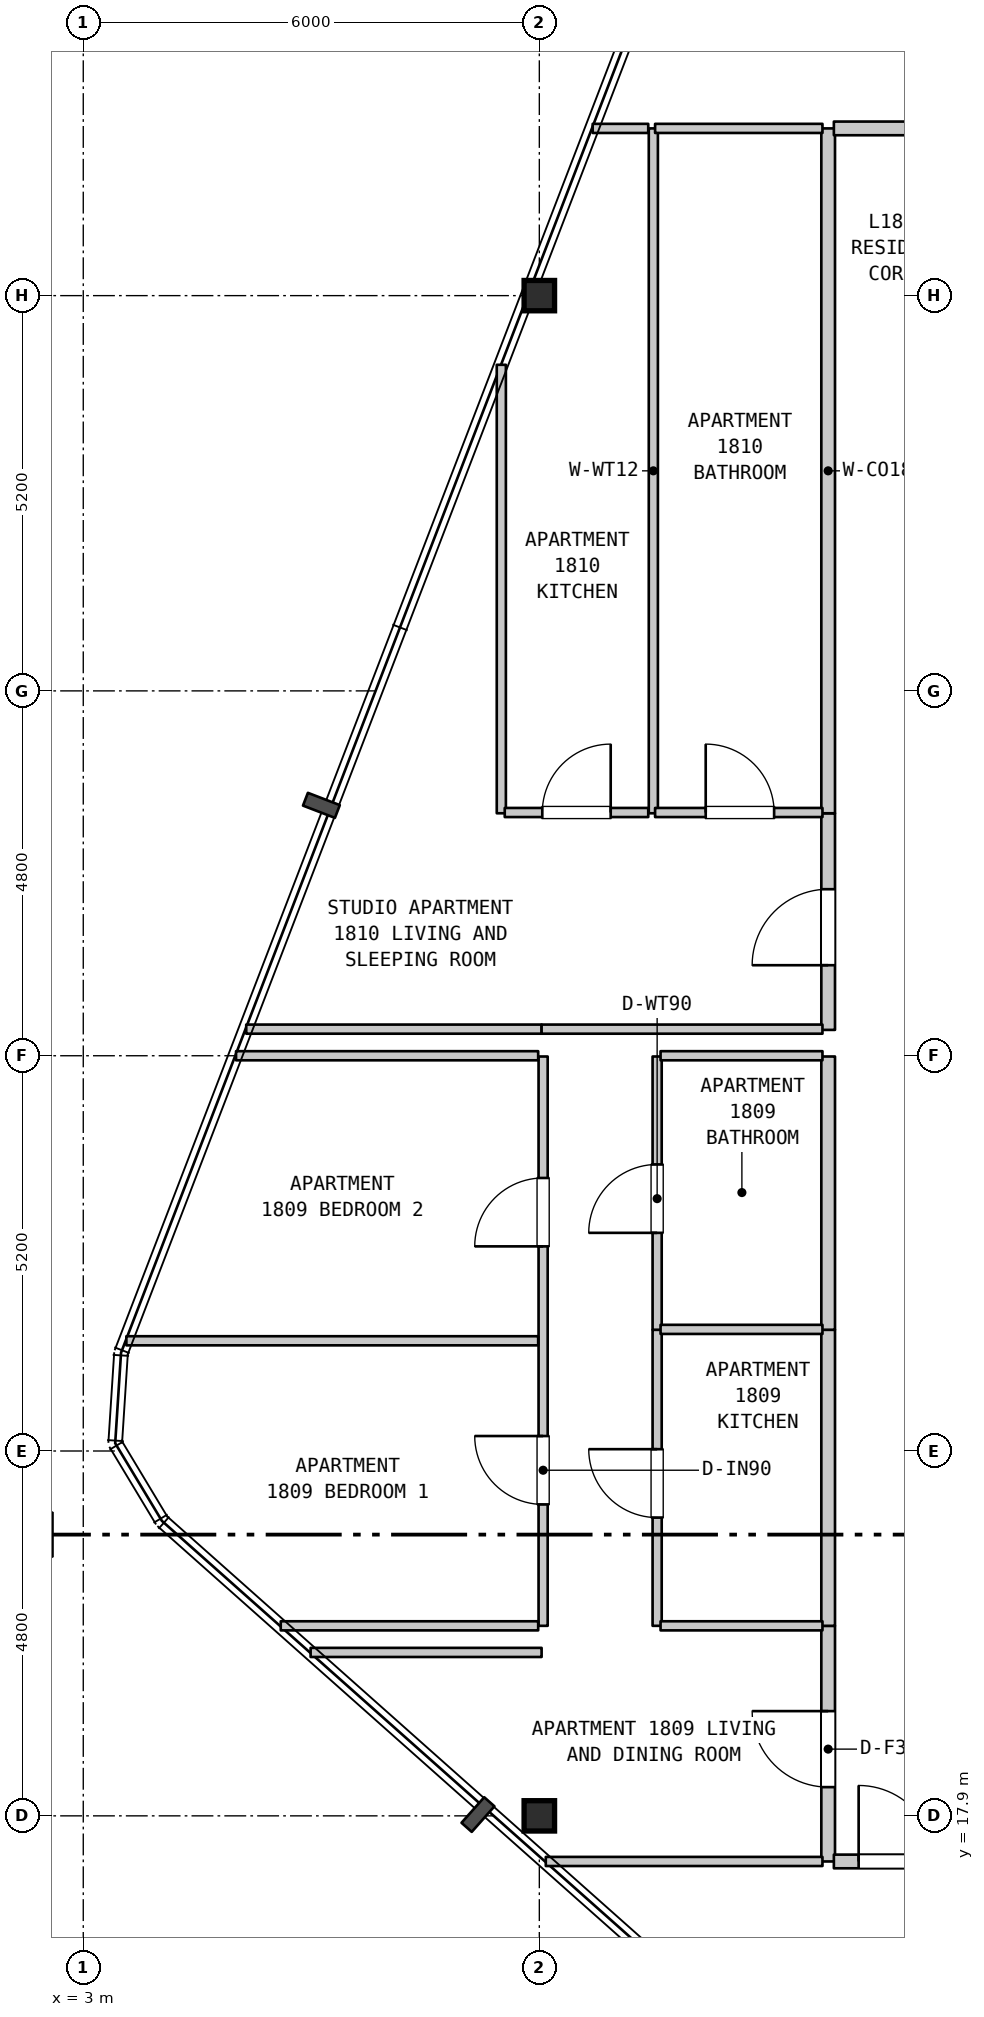
"""IFC4 building model, lengths in metres.
Left out: names, types, materials, properties, quantities, classifications, styles, units other than length and angle.
Written with IfcOpenShell. Run it as: python <this file> out.ifc"""

import sys

from ifc_helpers import new_model, si_unit, direction, frame, frame_2d, origin, origin_2d, place, context, subcontext, project, spatial, rectangle, i_section, extrude, element, fill, save


model = new_model("IFC4")
c1 = context("Model", 3, precision=1e-05, world=origin(), true_north=direction((0.0, 1.0)))
c2 = subcontext(c1, "Body", "Model", "MODEL_VIEW")
j1 = project(units=[si_unit("LENGTHUNIT", "METRE"), si_unit("PLANEANGLEUNIT", "RADIAN")], contexts=[c1])
p1 = place(None, origin())
s1 = spatial("IfcSite", under=j1, at=p1, CompositionType="ELEMENT")
p2 = place(p1, origin())
s2 = spatial("IfcBuilding", under=s1, at=p2, CompositionType="ELEMENT")
p3 = place(p2, frame((0.0, 0.0, 77.5)))
s3 = spatial("IfcBuildingStorey", under=s2, at=p3, CompositionType="ELEMENT", Elevation=77.5)
for number, where, z_axis, x_axis in (
    (1, (9.0, 17.9, 0.0), (0.0, 0.0, 1.0), (1.0, 0.0, 0.0)),
    (2, (9.0, 37.9, 0.0), (0.0, 0.0, 1.0), (1.0, 0.0, 0.0)),
):
    element("IfcColumn", number, at=place(p3, frame(where, z_axis=z_axis, x_axis=x_axis)), inside=s3, PredefinedType="COLUMN", context=c2, shape_type="SweptSolid", body=[
        extrude(i_section(OverallWidth=0.401, OverallDepth=0.399, WebThickness=0.025, FlangeThickness=0.04, FilletRadius=0.015, at=origin_2d()), origin(), (0.0, 0.0, 1.0), 3.7),
    ])
p4 = place(p3, frame((8.5, 31.09, 0.0), z_axis=(0.0, 0.0, 1.0), x_axis=(0.0, 1.0, 0.0)))
e3 = element("IfcWall", 3, at=p4, inside=s3, PredefinedType="PARTITIONING", context=c2, shape_type="SweptSolid", body=[
    extrude(rectangle(XDim=5.9, YDim=0.12, at=frame_2d((2.95, 0.0))), origin(), (0.0, 0.0, 1.0), 3.28),
])
p5 = place(p3, frame((9.05, 20.4, 0.0), z_axis=(0.0, 0.0, 1.0), x_axis=(0.0, 1.0, 0.0)))
e4 = element("IfcWall", 4, at=p5, inside=s3, PredefinedType="PARTITIONING", context=c2, shape_type="SweptSolid", body=[
    extrude(rectangle(XDim=7.49, YDim=0.12, at=frame_2d((3.745, 0.0))), origin(), (0.0, 0.0, 1.0), 2.68),
])
p6 = place(p5, frame((1.597, 0.0, 0.0)))
e5 = element("IfcOpeningElement", 5, at=p6, cuts=e4, PredefinedType="OPENING", context=c2, shape_type="SweptSolid", body=[
    extrude(rectangle(XDim=0.9, YDim=2.15, at=frame_2d((0.45, 1.075))), frame((0.0, 0.07, 0.0), z_axis=(0.0, -1.0, 0.0), x_axis=(1.0, 0.0, 0.0)), (0.0, 0.0, 1.0), 0.14),
])
p7 = place(p5, frame((4.992, 0.0, 0.0)))
e6 = element("IfcOpeningElement", 6, at=p7, cuts=e4, PredefinedType="OPENING", context=c2, shape_type="SweptSolid", body=[
    extrude(rectangle(XDim=0.9, YDim=2.15, at=frame_2d((0.45, 1.075))), frame((0.0, 0.07, 0.0), z_axis=(0.0, -1.0, 0.0), x_axis=(1.0, 0.0, 0.0)), (0.0, 0.0, 1.0), 0.14),
])
p8 = place(p3, frame((10.5, 31.09, 0.0), z_axis=(0.0, 0.0, 1.0), x_axis=(0.0, 1.0, 0.0)))
e7 = element("IfcWall", 7, at=p8, inside=s3, PredefinedType="PARTITIONING", context=c2, shape_type="SweptSolid", body=[
    extrude(rectangle(XDim=9.01, YDim=0.12, at=frame_2d((4.505, 0.0))), origin(), (0.0, 0.0, 1.0), 3.28),
])
p9 = place(p3, frame((10.55, 20.4, 0.0), z_axis=(0.0, 0.0, 1.0), x_axis=(0.0, 1.0, 0.0)))
e8 = element("IfcWall", 8, at=p9, inside=s3, PredefinedType="PARTITIONING", context=c2, shape_type="SweptSolid", body=[
    extrude(rectangle(XDim=3.895, YDim=0.12, at=frame_2d((1.948, 0.0))), origin(), (0.0, 0.0, 1.0), 3.28),
])
p10 = place(p9, frame((1.424, 0.0, 0.0)))
e9 = element("IfcOpeningElement", 9, at=p10, cuts=e8, PredefinedType="OPENING", context=c2, shape_type="SweptSolid", body=[
    extrude(rectangle(XDim=0.9, YDim=2.15, at=frame_2d((0.45, 1.075))), frame((0.0, 0.07, 0.0), z_axis=(0.0, -1.0, 0.0), x_axis=(1.0, 0.0, 0.0)), (0.0, 0.0, 1.0), 0.14),
])
p11 = place(p3, frame((10.55, 24.295, 0.0), z_axis=(0.0, 0.0, 1.0), x_axis=(0.0, 1.0, 0.0)))
e10 = element("IfcWall", 10, at=p11, inside=s3, PredefinedType="PARTITIONING", context=c2, shape_type="SweptSolid", body=[
    extrude(rectangle(XDim=3.595, YDim=0.12, at=frame_2d((1.797, 0.0))), origin(), (0.0, 0.0, 1.0), 3.28),
])
p12 = place(p11, frame((1.275, 0.0, 0.0)))
e11 = element("IfcOpeningElement", 11, at=p12, cuts=e10, PredefinedType="OPENING", context=c2, shape_type="SweptSolid", body=[
    extrude(rectangle(XDim=0.9, YDim=2.1, at=frame_2d((0.45, 1.05))), frame((0.0, 0.07, 0.0), z_axis=(0.0, -1.0, 0.0), x_axis=(1.0, 0.0, 0.0)), (0.0, 0.0, 1.0), 0.14),
])
p13 = place(p3, frame((12.8, 17.3, 0.0), z_axis=(0.0, 0.0, 1.0), x_axis=(0.0, 1.0, 0.0)))
e12 = element("IfcWall", 12, at=p13, inside=s3, PredefinedType="STANDARD", context=c2, shape_type="SweptSolid", body=[
    extrude(rectangle(XDim=3.1, YDim=0.18, at=frame_2d((1.55, 0.0))), origin(), (0.0, 0.0, 1.0), 3.28),
])
p14 = place(p13, frame((0.978, 0.0, 0.0)))
e13 = element("IfcOpeningElement", 13, at=p14, cuts=e12, PredefinedType="OPENING", context=c2, shape_type="SweptSolid", body=[
    extrude(rectangle(XDim=1.0, YDim=2.15, at=frame_2d((0.5, 1.075))), frame((0.0, 0.1, 0.0), z_axis=(0.0, -1.0, 0.0), x_axis=(1.0, 0.0, 0.0)), (0.0, 0.0, 1.0), 0.2),
])
p15 = place(p3, frame((12.8, 20.4, 0.0), z_axis=(0.0, 0.0, 1.0), x_axis=(0.0, 1.0, 0.0)))
e14 = element("IfcWall", 14, at=p15, inside=s3, PredefinedType="STANDARD", context=c2, shape_type="SweptSolid", body=[
    extrude(rectangle(XDim=3.895, YDim=0.18, at=frame_2d((1.948, 0.0))), origin(), (0.0, 0.0, 1.0), 3.28),
])
p16 = place(p3, frame((12.8, 24.295, 0.0), z_axis=(0.0, 0.0, 1.0), x_axis=(0.0, 1.0, 0.0)))
e15 = element("IfcWall", 15, at=p16, inside=s3, PredefinedType="STANDARD", context=c2, shape_type="SweptSolid", body=[
    extrude(rectangle(XDim=3.595, YDim=0.18, at=frame_2d((1.797, 0.0))), origin(), (0.0, 0.0, 1.0), 3.28),
])
p17 = place(p3, frame((12.8, 28.24, 0.0), z_axis=(0.0, 0.0, 1.0), x_axis=(0.0, 1.0, 0.0)))
e16 = element("IfcWall", 16, at=p17, inside=s3, PredefinedType="STANDARD", context=c2, shape_type="SweptSolid", body=[
    extrude(rectangle(XDim=2.85, YDim=0.18, at=frame_2d((1.425, 0.0))), origin(), (0.0, 0.0, 1.0), 3.28),
])
p18 = place(p17, frame((0.851, 0.0, 0.0)))
e17 = element("IfcOpeningElement", 17, at=p18, cuts=e16, PredefinedType="OPENING", context=c2, shape_type="SweptSolid", body=[
    extrude(rectangle(XDim=1.0, YDim=2.15, at=frame_2d((0.5, 1.075))), frame((0.0, 0.1, 0.0), z_axis=(0.0, -1.0, 0.0), x_axis=(1.0, 0.0, 0.0)), (0.0, 0.0, 1.0), 0.2),
])
p19 = place(p3, frame((12.8, 31.09, 0.0), z_axis=(0.0, 0.0, 1.0), x_axis=(0.0, 1.0, 0.0)))
e18 = element("IfcWall", 18, at=p19, inside=s3, PredefinedType="STANDARD", context=c2, shape_type="SweptSolid", body=[
    extrude(rectangle(XDim=9.01, YDim=0.18, at=frame_2d((4.505, 0.0))), origin(), (0.0, 0.0, 1.0), 3.28),
])
p20 = place(p3, frame((9.085, 17.3, 0.0), z_axis=(0.0, 0.0, 1.0), x_axis=(1.0, 0.0, 0.0)))
e19 = element("IfcWall", 19, at=p20, inside=s3, PredefinedType="PARTITIONING", context=c2, shape_type="SweptSolid", body=[
    extrude(rectangle(XDim=3.64, YDim=0.12, at=frame_2d((1.82, 0.0))), origin(), (0.0, 0.0, 1.0), 3.28),
])
p21 = place(p3, frame((12.875, 17.3, 0.0), z_axis=(0.0, 0.0, 1.0), x_axis=(1.0, 0.0, 0.0)))
e20 = element("IfcWall", 20, at=p21, inside=s3, PredefinedType="STANDARD", context=c2, shape_type="SweptSolid", body=[
    extrude(rectangle(XDim=3.28, YDim=0.18, at=frame_2d((1.64, 0.0))), origin(), (0.0, 0.0, 1.0), 3.28),
])
p22 = place(p21, frame((0.326, 0.0, 0.0)))
e21 = element("IfcOpeningElement", 21, at=p22, cuts=e20, PredefinedType="OPENING", context=c2, shape_type="SweptSolid", body=[
    extrude(rectangle(XDim=1.0, YDim=2.15, at=frame_2d((0.5, 1.075))), frame((0.0, 0.1, 0.0), z_axis=(0.0, -1.0, 0.0), x_axis=(1.0, 0.0, 0.0)), (0.0, 0.0, 1.0), 0.2),
])
p23 = place(p3, frame((5.991, 20.05, 0.0), z_axis=(0.0, 0.0, 1.0), x_axis=(1.0, 0.0, 0.0)))
e22 = element("IfcWall", 22, at=p23, inside=s3, PredefinedType="PARTITIONING", context=c2, shape_type="SweptSolid", body=[
    extrude(rectangle(XDim=3.039, YDim=0.12, at=frame_2d((1.52, 0.0))), origin(), (0.0, 0.0, 1.0), 3.28),
])
p24 = place(p3, frame((5.598, 20.4, 0.0), z_axis=(0.0, 0.0, 1.0), x_axis=(1.0, 0.0, 0.0)))
e23 = element("IfcWall", 23, at=p24, inside=s3, PredefinedType="PARTITIONING", context=c2, shape_type="SweptSolid", body=[
    extrude(rectangle(XDim=3.387, YDim=0.12, at=frame_2d((1.694, 0.0))), origin(), (0.0, 0.0, 1.0), 3.28),
])
p25 = place(p3, frame((10.595, 20.4, 0.0), z_axis=(0.0, 0.0, 1.0), x_axis=(1.0, 0.0, 0.0)))
e24 = element("IfcWall", 24, at=p25, inside=s3, PredefinedType="PARTITIONING", context=c2, shape_type="SweptSolid", body=[
    extrude(rectangle(XDim=2.13, YDim=0.12, at=frame_2d((1.065, 0.0))), origin(), (0.0, 0.0, 1.0), 3.28),
])
p26 = place(p3, frame((3.567, 24.15, 0.0), z_axis=(0.0, 0.0, 1.0), x_axis=(1.0, 0.0, 0.0)))
e25 = element("IfcWall", 25, at=p26, inside=s3, PredefinedType="PARTITIONING", context=c2, shape_type="SweptSolid", body=[
    extrude(rectangle(XDim=5.418, YDim=0.12, at=frame_2d((2.709, 0.0))), origin(), (0.0, 0.0, 1.0), 3.28),
])
p27 = place(p3, frame((10.595, 24.3, 0.0), z_axis=(0.0, 0.0, 1.0), x_axis=(1.0, 0.0, 0.0)))
e26 = element("IfcWall", 26, at=p27, inside=s3, PredefinedType="PARTITIONING", context=c2, shape_type="SweptSolid", body=[
    extrude(rectangle(XDim=2.13, YDim=0.12, at=frame_2d((1.065, 0.0))), origin(), (0.0, 0.0, 1.0), 3.28),
])
p28 = place(p3, frame((5.01, 27.9, 0.0), z_axis=(0.0, 0.0, 1.0), x_axis=(1.0, 0.0, 0.0)))
e27 = element("IfcWall", 27, at=p28, inside=s3, PredefinedType="PARTITIONING", context=c2, shape_type="SweptSolid", body=[
    extrude(rectangle(XDim=3.975, YDim=0.12, at=frame_2d((1.988, 0.0))), origin(), (0.0, 0.0, 1.0), 3.28),
])
p29 = place(p3, frame((10.595, 27.9, 0.0), z_axis=(0.0, 0.0, 1.0), x_axis=(1.0, 0.0, 0.0)))
e28 = element("IfcWall", 28, at=p29, inside=s3, PredefinedType="PARTITIONING", context=c2, shape_type="SweptSolid", body=[
    extrude(rectangle(XDim=2.13, YDim=0.12, at=frame_2d((1.065, 0.0))), origin(), (0.0, 0.0, 1.0), 3.28),
])
p30 = place(p3, frame((5.144, 28.25, 0.0), z_axis=(0.0, 0.0, 1.0), x_axis=(1.0, 0.0, 0.0)))
e29 = element("IfcWall", 29, at=p30, inside=s3, PredefinedType="PARTITIONING", context=c2, shape_type="SweptSolid", body=[
    extrude(rectangle(XDim=3.886, YDim=0.12, at=frame_2d((1.943, 0.0))), origin(), (0.0, 0.0, 1.0), 3.28),
])
p31 = place(p3, frame((9.03, 28.25, 0.0), z_axis=(0.0, 0.0, 1.0), x_axis=(1.0, 0.0, 0.0)))
e30 = element("IfcWall", 30, at=p31, inside=s3, PredefinedType="PARTITIONING", context=c2, shape_type="SweptSolid", body=[
    extrude(rectangle(XDim=3.695, YDim=0.12, at=frame_2d((1.848, 0.0))), origin(), (0.0, 0.0, 1.0), 3.28),
])
p32 = place(p3, frame((8.545, 31.1, 0.0), z_axis=(0.0, 0.0, 1.0), x_axis=(1.0, 0.0, 0.0)))
e31 = element("IfcWall", 31, at=p32, inside=s3, PredefinedType="PARTITIONING", context=c2, shape_type="SweptSolid", body=[
    extrude(rectangle(XDim=1.888, YDim=0.12, at=frame_2d((0.944, 0.0))), origin(), (0.0, 0.0, 1.0), 3.28),
])
p33 = place(p32, frame((0.494, 0.0, 0.0)))
e32 = element("IfcOpeningElement", 32, at=p33, cuts=e31, PredefinedType="OPENING", context=c2, shape_type="SweptSolid", body=[
    extrude(rectangle(XDim=0.9, YDim=2.15, at=frame_2d((0.45, 1.075))), frame((0.0, 0.07, 0.0), z_axis=(0.0, -1.0, 0.0), x_axis=(1.0, 0.0, 0.0)), (0.0, 0.0, 1.0), 0.14),
])
p34 = place(p3, frame((10.523, 31.1, 0.0), z_axis=(0.0, 0.0, 1.0), x_axis=(1.0, 0.0, 0.0)))
e33 = element("IfcWall", 33, at=p34, inside=s3, PredefinedType="PARTITIONING", context=c2, shape_type="SweptSolid", body=[
    extrude(rectangle(XDim=2.202, YDim=0.12, at=frame_2d((1.101, 0.0))), origin(), (0.0, 0.0, 1.0), 3.28),
])
p35 = place(p34, frame((0.666, 0.0, 0.0)))
e34 = element("IfcOpeningElement", 34, at=p35, cuts=e33, PredefinedType="OPENING", context=c2, shape_type="SweptSolid", body=[
    extrude(rectangle(XDim=0.9, YDim=2.1, at=frame_2d((0.45, 1.05))), frame((0.0, 0.07, 0.0), z_axis=(0.0, -1.0, 0.0), x_axis=(1.0, 0.0, 0.0)), (0.0, 0.0, 1.0), 0.14),
])
p36 = place(p3, frame((9.702, 40.1, 0.0), z_axis=(0.0, 0.0, 1.0), x_axis=(1.0, 0.0, 0.0)))
e35 = element("IfcWall", 35, at=p36, inside=s3, PredefinedType="PARTITIONING", context=c2, shape_type="SweptSolid", body=[
    extrude(rectangle(XDim=0.731, YDim=0.12, at=frame_2d((0.366, 0.0))), origin(), (0.0, 0.0, 1.0), 3.28),
])
p37 = place(p3, frame((10.523, 40.1, 0.0), z_axis=(0.0, 0.0, 1.0), x_axis=(1.0, 0.0, 0.0)))
e36 = element("IfcWall", 36, at=p37, inside=s3, PredefinedType="PARTITIONING", context=c2, shape_type="SweptSolid", body=[
    extrude(rectangle(XDim=2.202, YDim=0.12, at=frame_2d((1.101, 0.0))), origin(), (0.0, 0.0, 1.0), 3.28),
])
p38 = place(p3, frame((12.875, 40.1, 0.0), z_axis=(0.0, 0.0, 1.0), x_axis=(1.0, 0.0, 0.0)))
e37 = element("IfcWall", 37, at=p38, inside=s3, PredefinedType="STANDARD", context=c2, shape_type="SweptSolid", body=[
    extrude(rectangle(XDim=4.52, YDim=0.18, at=frame_2d((2.26, 0.0))), origin(), (0.0, 0.0, 1.0), 3.28),
])
p39 = place(p38, frame((1.745, 0.0, 0.0)))
e38 = element("IfcOpeningElement", 38, at=p39, cuts=e37, PredefinedType="OPENING", context=c2, shape_type="SweptSolid", body=[
    extrude(rectangle(XDim=1.0, YDim=2.15, at=frame_2d((0.5, 1.075))), frame((0.0, 0.1, 0.0), z_axis=(0.0, -1.0, 0.0), x_axis=(1.0, 0.0, 0.0)), (0.0, 0.0, 1.0), 0.2),
])
p40 = place(p6, origin())
e39 = element("IfcDoor", 39, at=p40, inside=s3, OperationType="SINGLE_SWING_RIGHT", PredefinedType="DOOR", context=c2, shape_type="SweptSolid", body=[
    extrude(rectangle(XDim=0.9, YDim=2.15, at=frame_2d((0.45, 1.075))), frame((0.0, 0.025, 0.0), z_axis=(0.0, -1.0, 0.0), x_axis=(1.0, 0.0, 0.0)), (0.0, 0.0, 1.0), 0.05),
])
fill(e5, e39)
p41 = place(p7, origin())
e40 = element("IfcDoor", 40, at=p41, inside=s3, OperationType="SINGLE_SWING_LEFT", PredefinedType="DOOR", context=c2, shape_type="SweptSolid", body=[
    extrude(rectangle(XDim=0.9, YDim=2.15, at=frame_2d((0.45, 1.075))), frame((0.0, 0.025, 0.0), z_axis=(0.0, -1.0, 0.0), x_axis=(1.0, 0.0, 0.0)), (0.0, 0.0, 1.0), 0.05),
])
fill(e6, e40)
p42 = place(p10, origin())
e41 = element("IfcDoor", 41, at=p42, inside=s3, OperationType="SINGLE_SWING_RIGHT", PredefinedType="DOOR", context=c2, shape_type="SweptSolid", body=[
    extrude(rectangle(XDim=0.9, YDim=2.15, at=frame_2d((0.45, 1.075))), frame((0.0, 0.025, 0.0), z_axis=(0.0, -1.0, 0.0), x_axis=(1.0, 0.0, 0.0)), (0.0, 0.0, 1.0), 0.05),
])
fill(e9, e41)
p43 = place(p12, origin())
e42 = element("IfcDoor", 42, at=p43, inside=s3, OperationType="SINGLE_SWING_LEFT", PredefinedType="DOOR", context=c2, shape_type="SweptSolid", body=[
    extrude(rectangle(XDim=0.9, YDim=2.1, at=frame_2d((0.45, 1.05))), frame((0.0, 0.025, 0.0), z_axis=(0.0, -1.0, 0.0), x_axis=(1.0, 0.0, 0.0)), (0.0, 0.0, 1.0), 0.05),
])
fill(e11, e42)
p44 = place(p14, origin())
e43 = element("IfcDoor", 43, at=p44, inside=s3, OperationType="SINGLE_SWING_RIGHT", PredefinedType="DOOR", context=c2, shape_type="SweptSolid", body=[
    extrude(rectangle(XDim=1.0, YDim=2.15, at=frame_2d((0.5, 1.075))), frame((0.0, 0.025, 0.0), z_axis=(0.0, -1.0, 0.0), x_axis=(1.0, 0.0, 0.0)), (0.0, 0.0, 1.0), 0.05),
])
fill(e13, e43)
p45 = place(p18, origin())
e44 = element("IfcDoor", 44, at=p45, inside=s3, OperationType="SINGLE_SWING_LEFT", PredefinedType="DOOR", context=c2, shape_type="SweptSolid", body=[
    extrude(rectangle(XDim=1.0, YDim=2.15, at=frame_2d((0.5, 1.075))), frame((0.0, 0.025, 0.0), z_axis=(0.0, -1.0, 0.0), x_axis=(1.0, 0.0, 0.0)), (0.0, 0.0, 1.0), 0.05),
])
fill(e17, e44)
p46 = place(p22, origin())
e45 = element("IfcDoor", 45, at=p46, inside=s3, OperationType="SINGLE_SWING_LEFT", PredefinedType="DOOR", context=c2, shape_type="SweptSolid", body=[
    extrude(rectangle(XDim=1.0, YDim=2.15, at=frame_2d((0.5, 1.075))), frame((0.0, 0.025, 0.0), z_axis=(0.0, -1.0, 0.0), x_axis=(1.0, 0.0, 0.0)), (0.0, 0.0, 1.0), 0.05),
])
fill(e21, e45)
p47 = place(p33, origin())
e46 = element("IfcDoor", 46, at=p47, inside=s3, OperationType="SINGLE_SWING_RIGHT", PredefinedType="DOOR", context=c2, shape_type="SweptSolid", body=[
    extrude(rectangle(XDim=0.9, YDim=2.15, at=frame_2d((0.45, 1.075))), frame((0.0, 0.025, 0.0), z_axis=(0.0, -1.0, 0.0), x_axis=(1.0, 0.0, 0.0)), (0.0, 0.0, 1.0), 0.05),
])
fill(e32, e46)
p48 = place(p35, origin())
e47 = element("IfcDoor", 47, at=p48, inside=s3, OperationType="SINGLE_SWING_LEFT", PredefinedType="DOOR", context=c2, shape_type="SweptSolid", body=[
    extrude(rectangle(XDim=0.9, YDim=2.1, at=frame_2d((0.45, 1.05))), frame((0.0, 0.025, 0.0), z_axis=(0.0, -1.0, 0.0), x_axis=(1.0, 0.0, 0.0)), (0.0, 0.0, 1.0), 0.05),
])
fill(e34, e47)
save(model, sys.argv[1])
